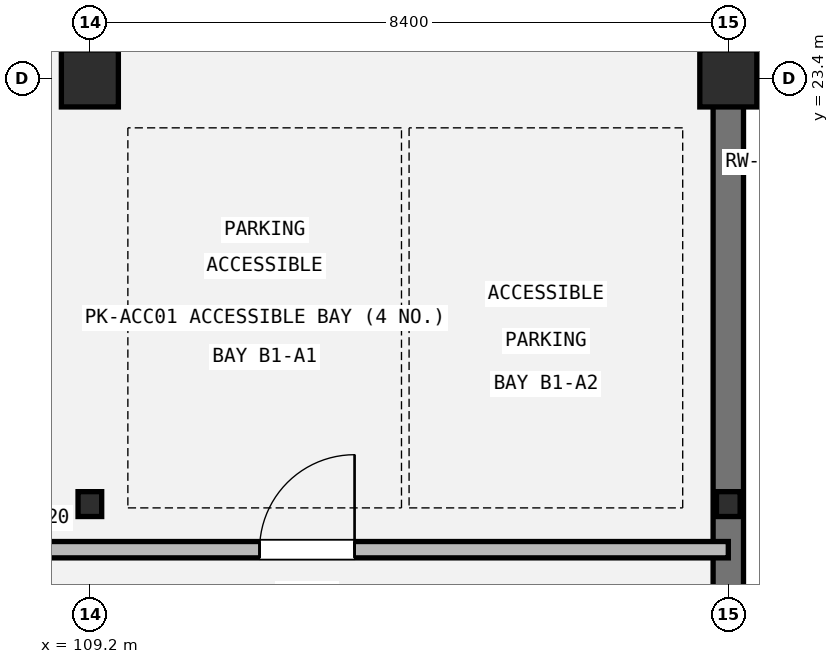
"""IFC4 building model, lengths in metres.
Left out: names, types, materials, properties, quantities, classifications, styles, units other than length and angle.
Written with IfcOpenShell. Run it as: python <this file> out.ifc"""

import sys

from ifc_helpers import new_model, si_unit, direction, frame, frame_2d, origin, origin_2d, place, context, subcontext, project, spatial, rectangle, i_section, extrude, element, fill, save


model = new_model("IFC4")
c1 = context("Model", 3, precision=1e-05, world=origin(), true_north=direction((0.0, 1.0)))
c2 = subcontext(c1, "Body", "Model", "MODEL_VIEW")
j1 = project(units=[si_unit("LENGTHUNIT", "METRE"), si_unit("PLANEANGLEUNIT", "RADIAN")], contexts=[c1])
p1 = place(None, origin())
s1 = spatial("IfcSite", under=j1, at=p1, CompositionType="ELEMENT")
p2 = place(p1, origin())
s2 = spatial("IfcBuilding", under=s1, at=p2, CompositionType="ELEMENT")
p3 = place(p2, frame((0.0, 0.0, -4.5)))
s3 = spatial("IfcBuildingStorey", under=s2, at=p3, CompositionType="ELEMENT", Elevation=-4.5)
for number, where, z_axis, x_axis in (
    (1, (109.2, 17.8, 0.0), (0.0, 0.0, 1.0), (1.0, 0.0, 0.0)),
    (2, (117.6, 17.8, 0.0), (0.0, 0.0, 1.0), (1.0, 0.0, 0.0)),
):
    element("IfcColumn", number, at=place(p3, frame(where, z_axis=z_axis, x_axis=x_axis)), inside=s3, PredefinedType="COLUMN", context=c2, shape_type="SweptSolid", body=[
        extrude(i_section(OverallWidth=0.311, OverallDepth=0.327, WebThickness=0.016, FlangeThickness=0.025, FilletRadius=0.015, at=origin_2d()), origin(), (0.0, 0.0, 1.0), 4.5),
    ])
for number, where, z_axis, x_axis in (
    (3, (109.2, 23.4, 0.0), (0.0, 0.0, 1.0), (1.0, 0.0, 0.0)),
    (4, (117.6, 23.4, 0.0), (0.0, 0.0, 1.0), (1.0, 0.0, 0.0)),
):
    element("IfcColumn", number, at=place(p3, frame(where, z_axis=z_axis, x_axis=x_axis)), inside=s3, PredefinedType="COLUMN", context=c2, shape_type="SweptSolid", body=[
        extrude(rectangle(XDim=0.75, YDim=0.75, at=origin_2d()), origin(), (0.0, 0.0, 1.0), 4.5),
    ])
p4 = place(p3, frame((117.6, 42.3, 0.0), z_axis=(0.0, 0.0, 1.0), x_axis=(0.0, -1.0, 0.0)))
e5 = element("IfcWall", 5, at=p4, inside=s3, PredefinedType="USERDEFINED", context=c2, shape_type="SweptSolid", body=[
    extrude(rectangle(XDim=36.5, YDim=0.4, at=frame_2d((18.25, 0.0))), origin(), (0.0, 0.0, 1.0), 4.24),
])
p5 = place(p3, frame((84.0, 17.2, 0.0), z_axis=(0.0, 0.0, 1.0), x_axis=(1.0, 0.0, 0.0)))
e6 = element("IfcWall", 6, at=p5, inside=s3, PredefinedType="STANDARD", context=c2, shape_type="SweptSolid", body=[
    extrude(rectangle(XDim=33.6, YDim=0.215, at=frame_2d((16.8, 0.0))), origin(), (0.0, 0.0, 1.0), 3.625),
])
p6 = place(p5, frame((27.433, 0.0, 0.0)))
e7 = element("IfcOpeningElement", 7, at=p6, cuts=e6, PredefinedType="OPENING", context=c2, shape_type="SweptSolid", body=[
    extrude(rectangle(XDim=1.25, YDim=2.15, at=frame_2d((0.625, 1.075))), frame((0.0, 0.117, 0.0), z_axis=(0.0, -1.0, 0.0), x_axis=(1.0, 0.0, 0.0)), (0.0, 0.0, 1.0), 0.235),
])
p7 = place(p6, origin())
e8 = element("IfcDoor", 8, at=p7, inside=s3, OperationType="SINGLE_SWING_RIGHT", PredefinedType="DOOR", context=c2, shape_type="SweptSolid", body=[
    extrude(rectangle(XDim=1.25, YDim=2.15, at=frame_2d((0.625, 1.075))), frame((0.0, 0.025, 0.0), z_axis=(0.0, -1.0, 0.0), x_axis=(1.0, 0.0, 0.0)), (0.0, 0.0, 1.0), 0.05),
])
fill(e7, e8)
save(model, sys.argv[1])
